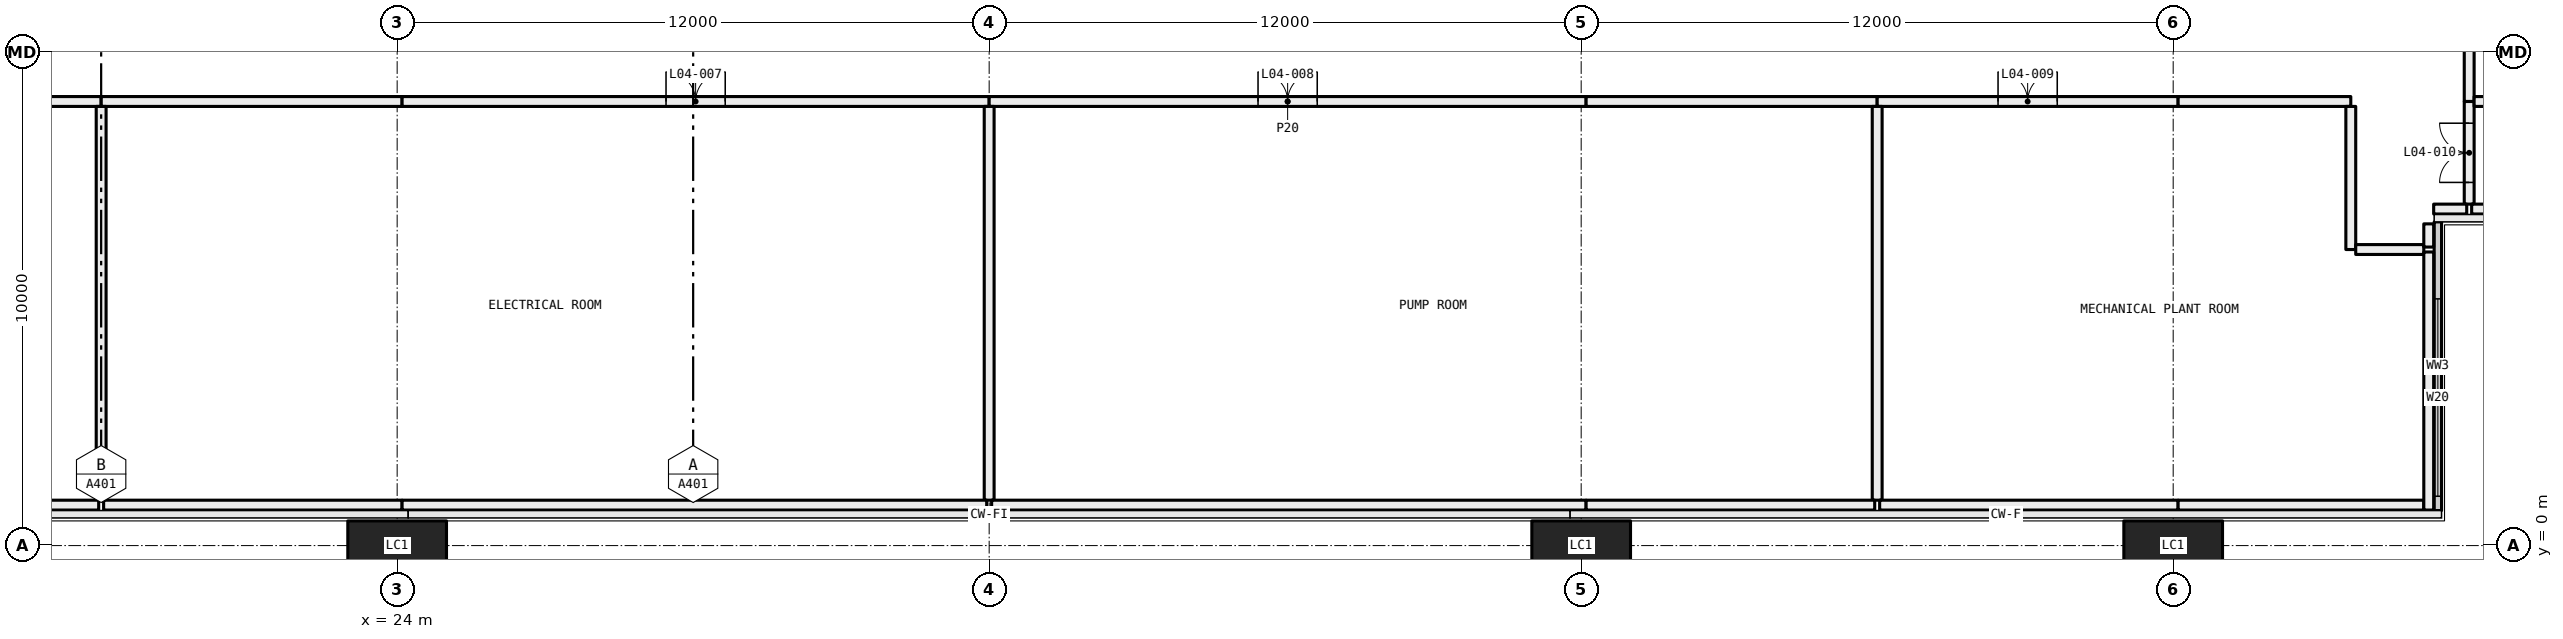
"""IFC4 building model, lengths in metres.
Left out: names, types, materials, properties, quantities, classifications, styles, units other than length and angle.
Written with IfcOpenShell. Run it as: python <this file> out.ifc"""

import sys

from ifc_helpers import new_model, si_unit, direction, frame, frame_2d, origin, origin_2d, place, context, subcontext, project, spatial, rectangle, hollow_rectangle, extrude, element, fill, save


model = new_model("IFC4")
c1 = context("Model", 3, precision=1e-05, world=origin(), true_north=direction((0.0, 1.0)))
c2 = subcontext(c1, "Body", "Model", "MODEL_VIEW")
j1 = project(units=[si_unit("LENGTHUNIT", "METRE"), si_unit("PLANEANGLEUNIT", "RADIAN")], contexts=[c1])
p1 = place(None, origin())
s1 = spatial("IfcSite", under=j1, at=p1, CompositionType="ELEMENT")
p2 = place(p1, origin())
s2 = spatial("IfcBuilding", under=s1, at=p2, CompositionType="ELEMENT")
p3 = place(p2, frame((0.0, 0.0, 24.0)))
s3 = spatial("IfcBuildingStorey", under=s2, at=p3, CompositionType="ELEMENT", Elevation=24.0)
for number, where, z_axis, x_axis in (
    (1, (24.0, 0.0, -0.4), (0.0, 0.0, 1.0), (1.0, 0.0, 0.0)),
    (2, (48.0, 0.0, -0.4), (0.0, 0.0, 1.0), (1.0, 0.0, 0.0)),
    (3, (60.0, 0.0, -0.4), (0.0, 0.0, 1.0), (1.0, 0.0, 0.0)),
):
    element("IfcColumn", number, at=place(p3, frame(where, z_axis=z_axis, x_axis=x_axis)), inside=s3, PredefinedType="COLUMN", context=c2, shape_type="SweptSolid", body=[
        extrude(hollow_rectangle(XDim=2.0, YDim=1.0, WallThickness=0.08, at=origin_2d()), origin(), (0.0, 0.0, 1.0), 6.0),
    ])
p4 = place(p3, frame((65.365, 0.71, 0.0), z_axis=(0.0, 0.0, 1.0), x_axis=(0.0, 1.0, 0.0)))
e4 = element("IfcWall", 4, at=p4, inside=s3, PredefinedType="ELEMENTEDWALL", context=c2, shape_type="SweptSolid", body=[
    extrude(rectangle(XDim=5.85, YDim=0.15, at=frame_2d((2.925, 0.0))), origin(), (0.0, 0.0, 1.0), 5.6),
])
p5 = place(p4, frame((0.29, 0.0, 3.0)))
e5 = element("IfcOpeningElement", 5, at=p5, cuts=e4, PredefinedType="OPENING", context=c2, shape_type="SweptSolid", body=[
    extrude(rectangle(XDim=4.0, YDim=2.55, at=frame_2d((2.0, 1.275))), frame((0.0, 0.085, 0.0), z_axis=(0.0, -1.0, 0.0), x_axis=(1.0, 0.0, 0.0)), (0.0, 0.0, 1.0), 0.17),
])
p6 = place(p3, frame((66.0, 9.0, 0.0), z_axis=(0.0, 0.0, 1.0), x_axis=(0.0, 1.0, 0.0)))
e6 = element("IfcWall", 6, at=p6, inside=s3, PredefinedType="PARTITIONING", context=c2, shape_type="SweptSolid", body=[
    extrude(rectangle(XDim=15.0, YDim=0.2, at=frame_2d((7.5, 0.0))), origin(), (0.0, 0.0, 1.0), 5.0),
])
p7 = place(p6, frame((6.9, 0.0, 0.0)))
e7 = element("IfcOpeningElement", 7, at=p7, cuts=e6, PredefinedType="OPENING", context=c2, shape_type="SweptSolid", body=[
    extrude(rectangle(XDim=1.2, YDim=2.1, at=frame_2d((0.6, 1.05))), frame((0.0, 0.11, 0.0), z_axis=(0.0, -1.0, 0.0), x_axis=(1.0, 0.0, 0.0)), (0.0, 0.0, 1.0), 0.22),
])
p8 = place(p3, frame((12.1, 9.0, 0.0), z_axis=(0.0, 0.0, 1.0), x_axis=(1.0, 0.0, 0.0)))
e8 = element("IfcWall", 8, at=p8, inside=s3, PredefinedType="PARTITIONING", context=c2, shape_type="SweptSolid", body=[
    extrude(rectangle(XDim=5.9, YDim=0.2, at=frame_2d((2.95, 0.0))), origin(), (0.0, 0.0, 1.0), 5.6),
])
p9 = place(p8, frame((2.35, 0.0, 0.0)))
e9 = element("IfcOpeningElement", 9, at=p9, cuts=e8, PredefinedType="OPENING", context=c2, shape_type="SweptSolid", body=[
    extrude(rectangle(XDim=1.2, YDim=2.1, at=frame_2d((0.6, 1.05))), frame((0.0, 0.11, 0.0), z_axis=(0.0, -1.0, 0.0), x_axis=(1.0, 0.0, 0.0)), (0.0, 0.0, 1.0), 0.22),
])
p10 = place(p3, frame((18.0, 9.0, 0.0), z_axis=(0.0, 0.0, 1.0), x_axis=(1.0, 0.0, 0.0)))
e10 = element("IfcWall", 10, at=p10, inside=s3, PredefinedType="PARTITIONING", context=c2, shape_type="SweptSolid", body=[
    extrude(rectangle(XDim=6.1, YDim=0.2, at=frame_2d((3.05, 0.0))), origin(), (0.0, 0.0, 1.0), 5.0),
])
p11 = place(p3, frame((24.1, 9.0, 0.0), z_axis=(0.0, 0.0, 1.0), x_axis=(1.0, 0.0, 0.0)))
e11 = element("IfcWall", 11, at=p11, inside=s3, PredefinedType="PARTITIONING", context=c2, shape_type="SweptSolid", body=[
    extrude(rectangle(XDim=11.9, YDim=0.2, at=frame_2d((5.95, 0.0))), origin(), (0.0, 0.0, 1.0), 5.6),
])
p12 = place(p11, frame((5.35, 0.0, 0.0)))
e12 = element("IfcOpeningElement", 12, at=p12, cuts=e11, PredefinedType="OPENING", context=c2, shape_type="SweptSolid", body=[
    extrude(rectangle(XDim=1.2, YDim=2.1, at=frame_2d((0.6, 1.05))), frame((0.0, 0.11, 0.0), z_axis=(0.0, -1.0, 0.0), x_axis=(1.0, 0.0, 0.0)), (0.0, 0.0, 1.0), 0.22),
])
p13 = place(p3, frame((36.0, 9.0, 0.0), z_axis=(0.0, 0.0, 1.0), x_axis=(1.0, 0.0, 0.0)))
e13 = element("IfcWall", 13, at=p13, inside=s3, PredefinedType="PARTITIONING", context=c2, shape_type="SweptSolid", body=[
    extrude(rectangle(XDim=12.1, YDim=0.2, at=frame_2d((6.05, 0.0))), origin(), (0.0, 0.0, 1.0), 5.0),
])
p14 = place(p13, frame((5.45, 0.0, 0.0)))
e14 = element("IfcOpeningElement", 14, at=p14, cuts=e13, PredefinedType="OPENING", context=c2, shape_type="SweptSolid", body=[
    extrude(rectangle(XDim=1.2, YDim=2.1, at=frame_2d((0.6, 1.05))), frame((0.0, 0.11, 0.0), z_axis=(0.0, -1.0, 0.0), x_axis=(1.0, 0.0, 0.0)), (0.0, 0.0, 1.0), 0.22),
])
p15 = place(p3, frame((48.1, 9.0, 0.0), z_axis=(0.0, 0.0, 1.0), x_axis=(1.0, 0.0, 0.0)))
e15 = element("IfcWall", 15, at=p15, inside=s3, PredefinedType="PARTITIONING", context=c2, shape_type="SweptSolid", body=[
    extrude(rectangle(XDim=5.9, YDim=0.2, at=frame_2d((2.95, 0.0))), origin(), (0.0, 0.0, 1.0), 5.6),
])
p16 = place(p3, frame((54.0, 9.0, 0.0), z_axis=(0.0, 0.0, 1.0), x_axis=(1.0, 0.0, 0.0)))
e16 = element("IfcWall", 16, at=p16, inside=s3, PredefinedType="PARTITIONING", context=c2, shape_type="SweptSolid", body=[
    extrude(rectangle(XDim=6.1, YDim=0.2, at=frame_2d((3.05, 0.0))), origin(), (0.0, 0.0, 1.0), 5.0),
])
p17 = place(p16, frame((2.45, 0.0, 0.0)))
e17 = element("IfcOpeningElement", 17, at=p17, cuts=e16, PredefinedType="OPENING", context=c2, shape_type="SweptSolid", body=[
    extrude(rectangle(XDim=1.2, YDim=2.1, at=frame_2d((0.6, 1.05))), frame((0.0, 0.11, 0.0), z_axis=(0.0, -1.0, 0.0), x_axis=(1.0, 0.0, 0.0)), (0.0, 0.0, 1.0), 0.22),
])
p18 = place(p3, frame((60.1, 9.0, 0.0), z_axis=(0.0, 0.0, 1.0), x_axis=(1.0, 0.0, 0.0)))
e18 = element("IfcWall", 18, at=p18, inside=s3, PredefinedType="PARTITIONING", context=c2, shape_type="SweptSolid", body=[
    extrude(rectangle(XDim=3.5, YDim=0.2, at=frame_2d((1.75, 0.0))), origin(), (0.0, 0.0, 1.0), 5.6),
])
p19 = place(p3, frame((63.6, 8.9, 0.0), z_axis=(0.0, 0.0, 1.0), x_axis=(0.0, -1.0, 0.0)))
e19 = element("IfcWall", 19, at=p19, inside=s3, PredefinedType="PARTITIONING", context=c2, shape_type="SweptSolid", body=[
    extrude(rectangle(XDim=2.9, YDim=0.2, at=frame_2d((1.45, 0.0))), origin(), (0.0, 0.0, 1.0), 5.6),
])
p20 = place(p3, frame((63.7, 6.0, 0.0), z_axis=(0.0, 0.0, 1.0), x_axis=(1.0, 0.0, 0.0)))
e20 = element("IfcWall", 20, at=p20, inside=s3, PredefinedType="PARTITIONING", context=c2, shape_type="SweptSolid", body=[
    extrude(rectangle(XDim=1.38, YDim=0.2, at=frame_2d((0.69, 0.0))), origin(), (0.0, 0.0, 1.0), 5.6),
])
p21 = place(p3, frame((66.0, 6.92, 0.0), z_axis=(0.0, 0.0, 1.0), x_axis=(0.0, 1.0, 0.0)))
e21 = element("IfcWall", 21, at=p21, inside=s3, PredefinedType="PARTITIONING", context=c2, shape_type="SweptSolid", body=[
    extrude(rectangle(XDim=2.08, YDim=0.2, at=frame_2d((1.04, 0.0))), origin(), (0.0, 0.0, 1.0), 5.6),
])
p22 = place(p21, frame((0.44, 0.0, 0.0)))
e22 = element("IfcOpeningElement", 22, at=p22, cuts=e21, PredefinedType="OPENING", context=c2, shape_type="SweptSolid", body=[
    extrude(rectangle(XDim=1.2, YDim=2.1, at=frame_2d((0.6, 1.05))), frame((0.0, 0.11, 0.0), z_axis=(0.0, -1.0, 0.0), x_axis=(1.0, 0.0, 0.0)), (0.0, 0.0, 1.0), 0.22),
])
p23 = place(p3, frame((66.1, 9.0, 0.0), z_axis=(0.0, 0.0, 1.0), x_axis=(1.0, 0.0, 0.0)))
e23 = element("IfcWall", 23, at=p23, inside=s3, PredefinedType="PARTITIONING", context=c2, shape_type="SweptSolid", body=[
    extrude(rectangle(XDim=4.98, YDim=0.2, at=frame_2d((2.49, 0.0))), origin(), (0.0, 0.0, 1.0), 5.6),
])
for number, where, z_axis, x_axis in (
    (24, (18.0, 0.92, 0.0), (0.0, 0.0, 1.0), (0.0, 1.0, 0.0)),
    (25, (36.0, 0.92, 0.0), (0.0, 0.0, 1.0), (0.0, 1.0, 0.0)),
    (26, (54.0, 0.92, 0.0), (0.0, 0.0, 1.0), (0.0, 1.0, 0.0)),
):
    element("IfcWall", number, at=place(p3, frame(where, z_axis=z_axis, x_axis=x_axis)), inside=s3, PredefinedType="PARTITIONING", context=c2, shape_type="SweptSolid", body=[
        extrude(rectangle(XDim=7.98, YDim=0.2, at=frame_2d((3.99, 0.0))), origin(), (0.0, 0.0, 1.0), 5.6),
    ])
p24 = place(p3, frame((65.18, 6.05, 0.0), z_axis=(0.0, 0.0, 1.0), x_axis=(0.0, 1.0, 0.0)))
e27 = element("IfcWall", 27, at=p24, inside=s3, PredefinedType="PARTITIONING", context=c2, shape_type="SweptSolid", body=[
    extrude(rectangle(XDim=0.47, YDim=0.2, at=frame_2d((0.235, 0.0))), origin(), (0.0, 0.0, 1.0), 5.6),
])
p25 = place(p3, frame((65.28, 6.82, 0.0), z_axis=(0.0, 0.0, 1.0), x_axis=(1.0, 0.0, 0.0)))
e28 = element("IfcWall", 28, at=p25, inside=s3, PredefinedType="PARTITIONING", context=c2, shape_type="SweptSolid", body=[
    extrude(rectangle(XDim=0.67, YDim=0.2, at=frame_2d((0.335, 0.0))), origin(), (0.0, 0.0, 1.0), 5.6),
])
p26 = place(p3, frame((12.1, 0.82, 0.0), z_axis=(0.0, 0.0, 1.0), x_axis=(1.0, 0.0, 0.0)))
e29 = element("IfcWall", 29, at=p26, inside=s3, PredefinedType="PARTITIONING", context=c2, shape_type="SweptSolid", body=[
    extrude(rectangle(XDim=5.85, YDim=0.2, at=frame_2d((2.925, 0.0))), origin(), (0.0, 0.0, 1.0), 5.6),
])
p27 = place(p3, frame((18.05, 0.82, 0.0), z_axis=(0.0, 0.0, 1.0), x_axis=(1.0, 0.0, 0.0)))
e30 = element("IfcWall", 30, at=p27, inside=s3, PredefinedType="PARTITIONING", context=c2, shape_type="SweptSolid", body=[
    extrude(rectangle(XDim=6.05, YDim=0.2, at=frame_2d((3.025, 0.0))), origin(), (0.0, 0.0, 1.0), 5.0),
])
p28 = place(p3, frame((24.1, 0.82, 0.0), z_axis=(0.0, 0.0, 1.0), x_axis=(1.0, 0.0, 0.0)))
e31 = element("IfcWall", 31, at=p28, inside=s3, PredefinedType="PARTITIONING", context=c2, shape_type="SweptSolid", body=[
    extrude(rectangle(XDim=11.85, YDim=0.2, at=frame_2d((5.925, 0.0))), origin(), (0.0, 0.0, 1.0), 5.6),
])
p29 = place(p3, frame((36.05, 0.82, 0.0), z_axis=(0.0, 0.0, 1.0), x_axis=(1.0, 0.0, 0.0)))
e32 = element("IfcWall", 32, at=p29, inside=s3, PredefinedType="PARTITIONING", context=c2, shape_type="SweptSolid", body=[
    extrude(rectangle(XDim=12.05, YDim=0.2, at=frame_2d((6.025, 0.0))), origin(), (0.0, 0.0, 1.0), 5.0),
])
p30 = place(p3, frame((48.1, 0.82, 0.0), z_axis=(0.0, 0.0, 1.0), x_axis=(1.0, 0.0, 0.0)))
e33 = element("IfcWall", 33, at=p30, inside=s3, PredefinedType="PARTITIONING", context=c2, shape_type="SweptSolid", body=[
    extrude(rectangle(XDim=5.85, YDim=0.2, at=frame_2d((2.925, 0.0))), origin(), (0.0, 0.0, 1.0), 5.6),
])
p31 = place(p3, frame((54.05, 0.82, 0.0), z_axis=(0.0, 0.0, 1.0), x_axis=(1.0, 0.0, 0.0)))
e34 = element("IfcWall", 34, at=p31, inside=s3, PredefinedType="PARTITIONING", context=c2, shape_type="SweptSolid", body=[
    extrude(rectangle(XDim=6.05, YDim=0.2, at=frame_2d((3.025, 0.0))), origin(), (0.0, 0.0, 1.0), 5.0),
])
p32 = place(p3, frame((60.1, 0.82, 0.0), z_axis=(0.0, 0.0, 1.0), x_axis=(1.0, 0.0, 0.0)))
e35 = element("IfcWall", 35, at=p32, inside=s3, PredefinedType="PARTITIONING", context=c2, shape_type="SweptSolid", body=[
    extrude(rectangle(XDim=4.98, YDim=0.2, at=frame_2d((2.49, 0.0))), origin(), (0.0, 0.0, 1.0), 5.6),
])
p33 = place(p3, frame((65.18, 0.72, 0.0), z_axis=(0.0, 0.0, 1.0), x_axis=(0.0, 1.0, 0.0)))
e36 = element("IfcWall", 36, at=p33, inside=s3, PredefinedType="PARTITIONING", context=c2, shape_type="SweptSolid", body=[
    extrude(rectangle(XDim=5.23, YDim=0.2, at=frame_2d((2.615, 0.0))), origin(), (0.0, 0.0, 1.0), 5.6),
])
p34 = place(p3, frame((66.05, 6.82, 0.0), z_axis=(0.0, 0.0, 1.0), x_axis=(1.0, 0.0, 0.0)))
e37 = element("IfcWall", 37, at=p34, inside=s3, PredefinedType="PARTITIONING", context=c2, shape_type="SweptSolid", body=[
    extrude(rectangle(XDim=5.03, YDim=0.2, at=frame_2d((2.515, 0.0))), origin(), (0.0, 0.0, 1.0), 5.6),
])
p35 = place(p5, origin())
e38 = element("IfcWindow", 38, at=p35, inside=s3, PartitioningType="SINGLE_PANEL", PredefinedType="WINDOW", context=c2, shape_type="SweptSolid", body=[
    extrude(rectangle(XDim=4.0, YDim=2.55, at=frame_2d((2.0, 1.275))), frame((0.0, 0.03, 0.0), z_axis=(0.0, -1.0, 0.0), x_axis=(1.0, 0.0, 0.0)), (0.0, 0.0, 1.0), 0.06),
])
fill(e5, e38)
p36 = place(p12, origin())
e39 = element("IfcDoor", 39, at=p36, inside=s3, OperationType="DOUBLE_DOOR_SINGLE_SWING", PredefinedType="DOOR", context=c2, shape_type="SweptSolid", body=[
    extrude(rectangle(XDim=1.2, YDim=2.1, at=frame_2d((0.6, 1.05))), frame((0.0, 0.025, 0.0), z_axis=(0.0, -1.0, 0.0), x_axis=(1.0, 0.0, 0.0)), (0.0, 0.0, 1.0), 0.05),
])
fill(e12, e39)
p37 = place(p14, origin())
e40 = element("IfcDoor", 40, at=p37, inside=s3, OperationType="DOUBLE_DOOR_SINGLE_SWING", PredefinedType="DOOR", context=c2, shape_type="SweptSolid", body=[
    extrude(rectangle(XDim=1.2, YDim=2.1, at=frame_2d((0.6, 1.05))), frame((0.0, 0.025, 0.0), z_axis=(0.0, -1.0, 0.0), x_axis=(1.0, 0.0, 0.0)), (0.0, 0.0, 1.0), 0.05),
])
fill(e14, e40)
p38 = place(p17, origin())
e41 = element("IfcDoor", 41, at=p38, inside=s3, OperationType="DOUBLE_DOOR_SINGLE_SWING", PredefinedType="DOOR", context=c2, shape_type="SweptSolid", body=[
    extrude(rectangle(XDim=1.2, YDim=2.1, at=frame_2d((0.6, 1.05))), frame((0.0, 0.025, 0.0), z_axis=(0.0, -1.0, 0.0), x_axis=(1.0, 0.0, 0.0)), (0.0, 0.0, 1.0), 0.05),
])
fill(e17, e41)
p39 = place(p22, origin())
e42 = element("IfcDoor", 42, at=p39, inside=s3, OperationType="DOUBLE_DOOR_SINGLE_SWING", PredefinedType="DOOR", context=c2, shape_type="SweptSolid", body=[
    extrude(rectangle(XDim=1.2, YDim=2.1, at=frame_2d((0.6, 1.05))), frame((0.0, 0.025, 0.0), z_axis=(0.0, -1.0, 0.0), x_axis=(1.0, 0.0, 0.0)), (0.0, 0.0, 1.0), 0.05),
])
fill(e22, e42)
save(model, sys.argv[1])
